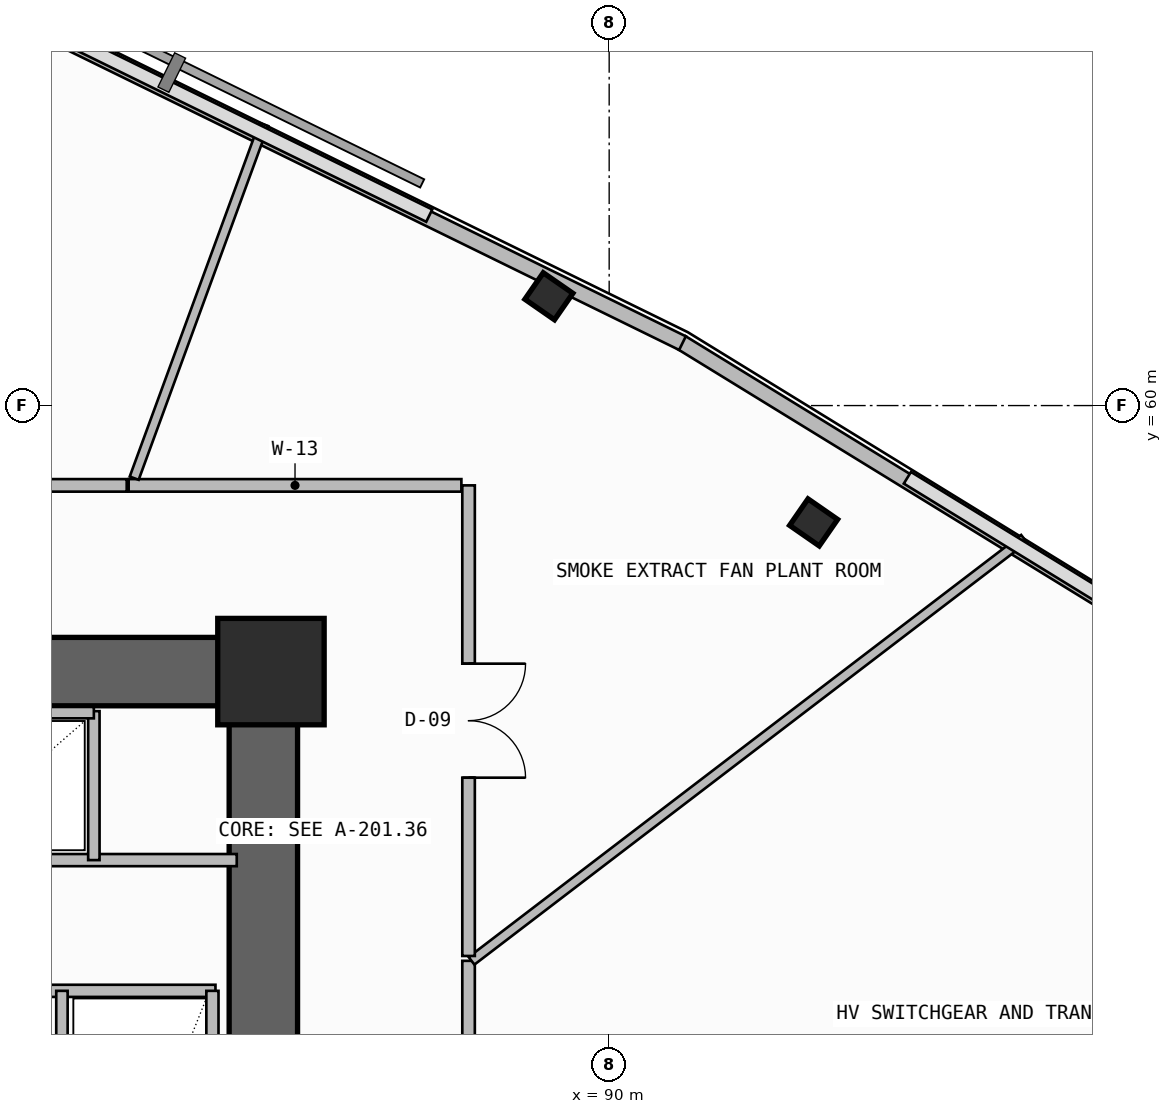
"""IFC4 building model, lengths in metres.
Left out: names, types, materials, properties, quantities, classifications, styles, units other than length and angle.
Written with IfcOpenShell. Run it as: python <this file> out.ifc"""

import sys

from ifc_helpers import new_model, si_unit, direction, frame, frame_2d, origin, origin_2d, place, context, subcontext, project, spatial, rectangle, i_section, extrude, element, fill, save


model = new_model("IFC4")
c1 = context("Model", 3, precision=1e-05, world=origin(), true_north=direction((0.0, 1.0)))
c2 = subcontext(c1, "Body", "Model", "MODEL_VIEW")
j1 = project(units=[si_unit("LENGTHUNIT", "METRE"), si_unit("PLANEANGLEUNIT", "RADIAN")], contexts=[c1])
p1 = place(None, origin())
s1 = spatial("IfcSite", under=j1, at=p1, CompositionType="ELEMENT")
p2 = place(p1, origin())
s2 = spatial("IfcBuilding", under=s1, at=p2, CompositionType="ELEMENT")
p3 = place(p2, frame((0.0, 0.0, 128.1)))
s3 = spatial("IfcBuildingStorey", under=s2, at=p3, CompositionType="ELEMENT", Elevation=128.1)
p4 = place(p3, frame((72.0, 56.5, -0.5), z_axis=(0.0, 0.0, 1.0), x_axis=(1.0, 0.0, 0.0)))
e1 = element("IfcWall", 1, at=p4, inside=s3, PredefinedType="SHEAR", context=c2, shape_type="SweptSolid", body=[
    extrude(rectangle(XDim=13.9, YDim=0.9, at=frame_2d((6.95, 0.0))), origin(), (0.0, 0.0, 1.0), 4.3),
])
p5 = place(p3, frame((85.45, 47.6, -0.5), z_axis=(0.0, 0.0, 1.0), x_axis=(0.0, 1.0, 0.0)))
e2 = element("IfcWall", 2, at=p5, inside=s3, PredefinedType="SHEAR", context=c2, shape_type="SweptSolid", body=[
    extrude(rectangle(XDim=8.45, YDim=0.9, at=frame_2d((4.225, 0.0))), origin(), (0.0, 0.0, 1.0), 4.3),
])
p6 = place(p3, frame((85.55, 56.5, 0.0), z_axis=(0.0, 0.0, 1.0), x_axis=(1.0, 0.0, 0.0)))
e3 = element("IfcColumn", 3, at=p6, inside=s3, PredefinedType="COLUMN", context=c2, shape_type="SweptSolid", body=[
    extrude(rectangle(XDim=1.4, YDim=1.4, at=origin_2d()), origin(), (0.0, 0.0, 1.0), 4.2),
])
for number, where, z_axis, x_axis in (
    (4, (92.69, 58.463, 0.0), (0.0, 0.0, 1.0), (0.57, 0.822, 0.0)),
    (5, (89.207, 61.438, 0.0), (0.0, 0.0, 1.0), (0.57, 0.822, 0.0)),
):
    element("IfcColumn", number, at=place(p3, frame(where, z_axis=z_axis, x_axis=x_axis)), inside=s3, PredefinedType="COLUMN", context=c2, shape_type="SweptSolid", body=[
        extrude(i_section(OverallWidth=0.424, OverallDepth=0.474, WebThickness=0.048, FlangeThickness=0.077, FilletRadius=0.015, at=origin_2d()), origin(), (0.0, 0.0, 1.0), 4.2),
    ])
p7 = place(p3, frame((119.865, 43.07, 0.0), z_axis=(0.0, 0.0, 1.0), x_axis=(-0.852110824326, 0.52336138859, 0.0)))
e6 = element("IfcWall", 6, at=p7, inside=s3, PredefinedType="PARAPET", context=c2, shape_type="SweptSolid", body=[
    extrude(rectangle(XDim=33.932, YDim=0.2, at=frame_2d((16.966, 0.0))), origin(), (0.0, 0.0, 1.0), 1.15),
])
p8 = place(p3, frame((90.964, 60.822, 0.0), z_axis=(0.0, 0.0, 1.0), x_axis=(-0.897994223128, 0.440007244519, 0.0)))
e7 = element("IfcWall", 7, at=p8, inside=s3, PredefinedType="PARAPET", context=c2, shape_type="SweptSolid", body=[
    extrude(rectangle(XDim=33.947, YDim=0.2, at=frame_2d((16.973, 0.0))), origin(), (0.0, 0.0, 1.0), 1.15),
])
p9 = place(p3, frame((80.6, 52.3, 0.0), z_axis=(0.0, 0.0, 1.0), x_axis=(1.0, 0.0, 0.0)))
e8 = element("IfcWall", 8, at=p9, inside=s3, PredefinedType="SOLIDWALL", context=c2, shape_type="SweptSolid", body=[
    extrude(rectangle(XDim=4.22, YDim=0.16, at=frame_2d((2.11, 0.0))), origin(), (0.0, 0.0, 1.0), 3.8),
])
p10 = place(p3, frame((82.8, 47.7, 0.0), z_axis=(0.0, 0.0, 1.0), x_axis=(0.0, 1.0, 0.0)))
e9 = element("IfcWall", 9, at=p10, inside=s3, PredefinedType="PLUMBINGWALL", context=c2, shape_type="SweptSolid", body=[
    extrude(rectangle(XDim=4.6, YDim=0.15, at=frame_2d((2.3, 0.0))), origin(), (0.0, 0.0, 1.0), 3.8),
])
p11 = place(p3, frame((84.78, 47.7, 0.0), z_axis=(0.0, 0.0, 1.0), x_axis=(0.0, 1.0, 0.0)))
e10 = element("IfcWall", 10, at=p11, inside=s3, PredefinedType="SOLIDWALL", context=c2, shape_type="SweptSolid", body=[
    extrude(rectangle(XDim=4.6, YDim=0.16, at=frame_2d((2.3, 0.0))), origin(), (0.0, 0.0, 1.0), 3.8),
])
p12 = place(p3, frame((73.02, 54.02, 0.0), z_axis=(0.0, 0.0, 1.0), x_axis=(1.0, 0.0, 0.0)))
e11 = element("IfcWall", 11, at=p12, inside=s3, PredefinedType="SOLIDWALL", context=c2, shape_type="SweptSolid", body=[
    extrude(rectangle(XDim=12.08, YDim=0.16, at=frame_2d((6.04, 0.0))), origin(), (0.0, 0.0, 1.0), 3.8),
])
p13 = place(p3, frame((83.22, 54.02, 0.0), z_axis=(0.0, 0.0, 1.0), x_axis=(0.0, 1.0, 0.0)))
e12 = element("IfcWall", 12, at=p13, inside=s3, PredefinedType="SOLIDWALL", context=c2, shape_type="SweptSolid", body=[
    extrude(rectangle(XDim=1.96, YDim=0.15, at=frame_2d((0.98, 0.0))), origin(), (0.0, 0.0, 1.0), 3.8),
])
p14 = place(p3, frame((76.52, 55.96, 0.0), z_axis=(0.0, 0.0, 1.0), x_axis=(1.0, 0.0, 0.0)))
e13 = element("IfcWall", 13, at=p14, inside=s3, PredefinedType="SOLIDWALL", context=c2, shape_type="SweptSolid", body=[
    extrude(rectangle(XDim=6.7, YDim=0.15, at=frame_2d((3.35, 0.0))), origin(), (0.0, 0.0, 1.0), 3.8),
])
p15 = place(p3, frame((88.15, 46.352, 0.0), z_axis=(0.0, 0.0, 1.0), x_axis=(0.0, 1.0, 0.0)))
e14 = element("IfcWall", 14, at=p15, inside=s3, PredefinedType="PARTITIONING", context=c2, shape_type="SweptSolid", body=[
    extrude(rectangle(XDim=6.343, YDim=0.165, at=frame_2d((3.172, 0.0))), origin(), (0.0, 0.0, 1.0), 3.8),
])
p16 = place(p15, frame((2.422, 0.0, 0.0)))
e15 = element("IfcOpeningElement", 15, at=p16, cuts=e14, PredefinedType="OPENING", context=c2, shape_type="SweptSolid", body=[
    extrude(rectangle(XDim=1.5, YDim=2.25, at=frame_2d((0.75, 1.125))), frame((0.0, 0.093, 0.0), z_axis=(0.0, -1.0, 0.0), x_axis=(1.0, 0.0, 0.0)), (0.0, 0.0, 1.0), 0.185),
])
p17 = place(p3, frame((88.189, 52.695, 0.0), z_axis=(0.0, 0.0, 1.0), x_axis=(0.794642575685, 0.607077570751, 0.0)))
e16 = element("IfcWall", 16, at=p17, inside=s3, PredefinedType="PARTITIONING", context=c2, shape_type="SweptSolid", body=[
    extrude(rectangle(XDim=9.148, YDim=0.125, at=frame_2d((4.574, 0.0))), origin(), (0.0, 0.0, 1.0), 2.777),
])
p18 = place(p3, frame((88.15, 52.759, 0.0), z_axis=(0.0, 0.0, 1.0), x_axis=(0.0, 1.0, 0.0)))
e17 = element("IfcWall", 17, at=p18, inside=s3, PredefinedType="PARTITIONING", context=c2, shape_type="SweptSolid", body=[
    extrude(rectangle(XDim=6.191, YDim=0.165, at=frame_2d((3.096, 0.0))), origin(), (0.0, 0.0, 1.0), 2.777),
])
p19 = place(p18, frame((2.346, 0.0, 0.0)))
e18 = element("IfcOpeningElement", 18, at=p19, cuts=e17, PredefinedType="OPENING", context=c2, shape_type="SweptSolid", body=[
    extrude(rectangle(XDim=1.5, YDim=2.25, at=frame_2d((0.75, 1.125))), frame((0.0, 0.093, 0.0), z_axis=(0.0, -1.0, 0.0), x_axis=(1.0, 0.0, 0.0)), (0.0, 0.0, 1.0), 0.185),
])
p20 = place(p3, frame((88.055, 58.95, 0.0), z_axis=(0.0, 0.0, 1.0), x_axis=(-1.0, 0.0, 0.0)))
e19 = element("IfcWall", 19, at=p20, inside=s3, PredefinedType="PARTITIONING", context=c2, shape_type="SweptSolid", body=[
    extrude(rectangle(XDim=4.378, YDim=0.165, at=frame_2d((2.189, 0.0))), origin(), (0.0, 0.0, 1.0), 2.777),
])
p21 = place(p3, frame((83.751, 59.044, 0.0), z_axis=(0.0, 0.0, 1.0), x_axis=(0.343972438463, 0.938979745031, 0.0)))
e20 = element("IfcWall", 20, at=p21, inside=s3, PredefinedType="PARTITIONING", context=c2, shape_type="SweptSolid", body=[
    extrude(rectangle(XDim=4.957, YDim=0.125, at=frame_2d((2.479, 0.0))), origin(), (0.0, 0.0, 1.0), 3.8),
])
p22 = place(p3, frame((83.652, 58.95, 0.0), z_axis=(0.0, 0.0, 1.0), x_axis=(-1.0, 0.0, 0.0)))
e21 = element("IfcWall", 21, at=p22, inside=s3, PredefinedType="PARTITIONING", context=c2, shape_type="SweptSolid", body=[
    extrude(rectangle(XDim=7.85, YDim=0.165, at=frame_2d((3.925, 0.0))), origin(), (0.0, 0.0, 1.0), 3.8),
])
p23 = place(p22, frame((3.175, 0.0, 0.0)))
e22 = element("IfcOpeningElement", 22, at=p23, cuts=e21, PredefinedType="OPENING", context=c2, shape_type="SweptSolid", body=[
    extrude(rectangle(XDim=1.5, YDim=2.25, at=frame_2d((0.75, 1.125))), frame((0.0, 0.093, 0.0), z_axis=(0.0, -1.0, 0.0), x_axis=(1.0, 0.0, 0.0)), (0.0, 0.0, 1.0), 0.185),
])
p24 = place(p19, frame((1.5, 0.0, 0.0), z_axis=(0.0, 0.0, 1.0), x_axis=(-1.0, 0.0, 0.0)))
e23 = element("IfcDoor", 23, at=p24, inside=s3, OperationType="DOUBLE_DOOR_SINGLE_SWING", PredefinedType="DOOR", context=c2, shape_type="SweptSolid", body=[
    extrude(rectangle(XDim=1.5, YDim=2.25, at=frame_2d((0.75, 1.125))), frame((0.0, 0.025, 0.0), z_axis=(0.0, -1.0, 0.0), x_axis=(1.0, 0.0, 0.0)), (0.0, 0.0, 1.0), 0.05),
])
fill(e18, e23)
save(model, sys.argv[1])
